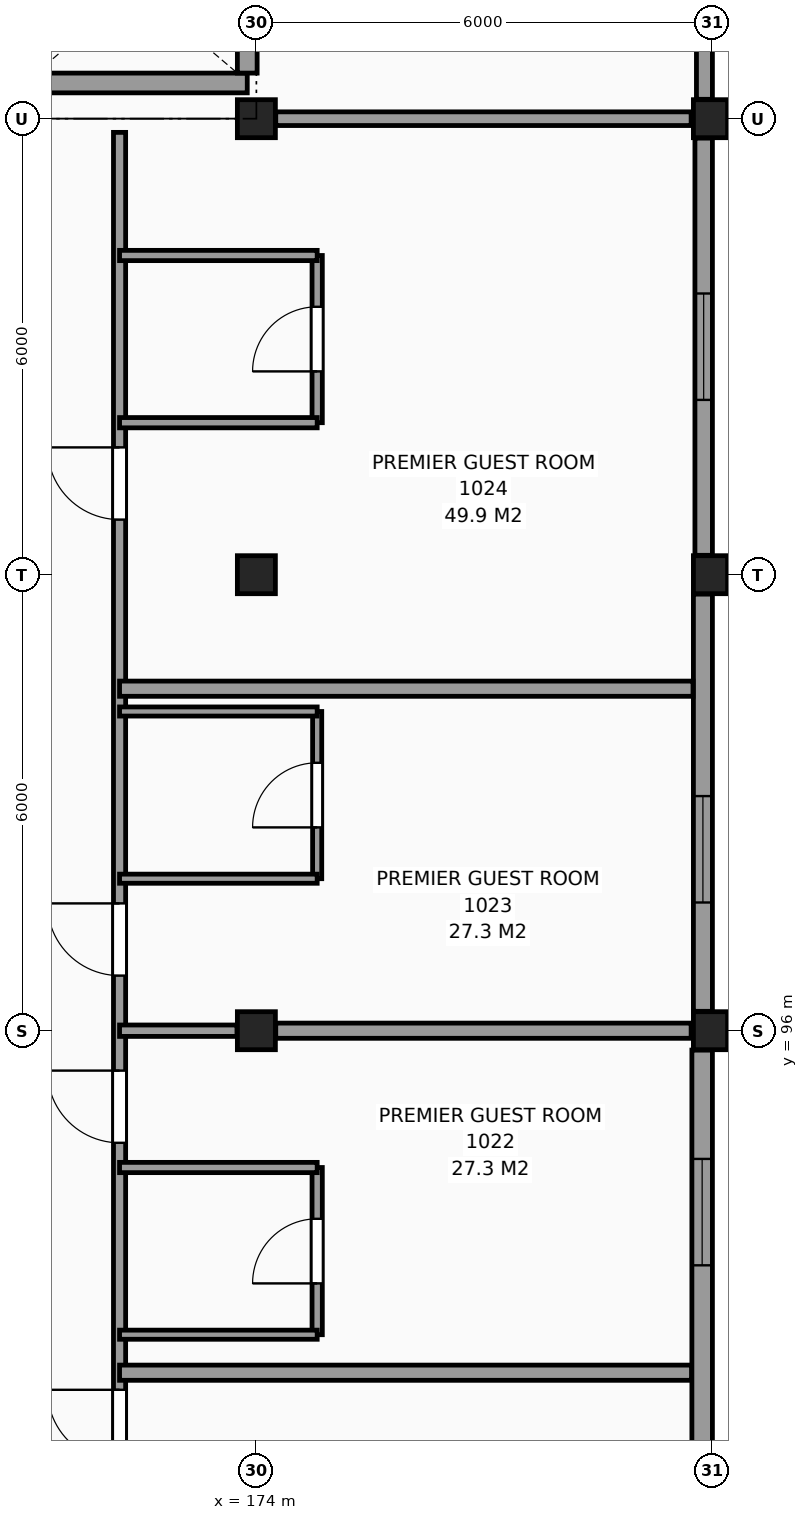
"""IFC4 building model, lengths in metres.
Left out: names, types, materials, properties, quantities, classifications, styles, units other than length and angle.
Written with IfcOpenShell. Run it as: python <this file> out.ifc"""

import sys

from ifc_helpers import new_model, si_unit, direction, frame, frame_2d, origin, origin_2d, place, context, subcontext, project, spatial, rectangle, extrude, element, fill, save


model = new_model("IFC4")
c1 = context("Model", 3, precision=1e-05, world=origin(), true_north=direction((0.0, 1.0)))
c2 = subcontext(c1, "Body", "Model", "MODEL_VIEW")
j1 = project(units=[si_unit("LENGTHUNIT", "METRE"), si_unit("PLANEANGLEUNIT", "RADIAN")], contexts=[c1])
p1 = place(None, origin())
s1 = spatial("IfcSite", under=j1, at=p1, CompositionType="ELEMENT")
p2 = place(p1, origin())
s2 = spatial("IfcBuilding", under=s1, at=p2, CompositionType="ELEMENT")
p3 = place(p2, frame((0.0, 0.0, 41.4)))
s3 = spatial("IfcBuildingStorey", under=s2, at=p3, CompositionType="ELEMENT", Elevation=41.4)
for number, where, z_axis, x_axis in (
    (1, (174.0, 96.0, 0.0), (0.0, 0.0, 1.0), (1.0, 0.0, 0.0)),
    (2, (174.0, 102.0, 0.0), (0.0, 0.0, 1.0), (1.0, 0.0, 0.0)),
    (3, (174.0, 108.0, 0.0), (0.0, 0.0, 1.0), (1.0, 0.0, 0.0)),
    (4, (180.0, 96.0, 0.0), (0.0, 0.0, 1.0), (1.0, 0.0, 0.0)),
    (5, (180.0, 102.0, 0.0), (0.0, 0.0, 1.0), (1.0, 0.0, 0.0)),
    (6, (180.0, 108.0, 0.0), (0.0, 0.0, 1.0), (1.0, 0.0, 0.0)),
):
    element("IfcColumn", number, at=place(p3, frame(where, z_axis=z_axis, x_axis=x_axis)), inside=s3, PredefinedType="COLUMN", context=c2, shape_type="SweptSolid", body=[
        extrude(rectangle(XDim=0.5, YDim=0.5, at=origin_2d()), origin(), (0.0, 0.0, 1.0), 3.3),
    ])
p4 = place(p3, frame((179.865, 90.255, 0.0), z_axis=(0.0, 0.0, 1.0), x_axis=(0.0, 1.0, 0.0)))
e7 = element("IfcWall", 7, at=p4, inside=s3, PredefinedType="SOLIDWALL", context=c2, shape_type="SweptSolid", body=[
    extrude(rectangle(XDim=5.49, YDim=0.27, at=frame_2d((2.745, 0.0))), origin(), (0.0, 0.0, 1.0), 2.41),
])
p5 = place(p4, frame((2.658, 0.0, 0.8)))
e8 = element("IfcOpeningElement", 8, at=p5, cuts=e7, PredefinedType="OPENING", context=c2, shape_type="SweptSolid", body=[
    extrude(rectangle(XDim=1.4, YDim=1.4, at=frame_2d((0.7, 0.7))), frame((0.0, 0.145, 0.0), z_axis=(0.0, -1.0, 0.0), x_axis=(1.0, 0.0, 0.0)), (0.0, 0.0, 1.0), 0.29),
])
p6 = place(p3, frame((179.875, 96.255, 0.0), z_axis=(0.0, 0.0, 1.0), x_axis=(0.0, 1.0, 0.0)))
e9 = element("IfcWall", 9, at=p6, inside=s3, PredefinedType="SOLIDWALL", context=c2, shape_type="SweptSolid", body=[
    extrude(rectangle(XDim=5.49, YDim=0.25, at=frame_2d((2.745, 0.0))), origin(), (0.0, 0.0, 1.0), 2.41),
])
p7 = place(p6, frame((1.432, 0.0, 0.8)))
e10 = element("IfcOpeningElement", 10, at=p7, cuts=e9, PredefinedType="OPENING", context=c2, shape_type="SweptSolid", body=[
    extrude(rectangle(XDim=1.4, YDim=1.4, at=frame_2d((0.7, 0.7))), frame((0.0, 0.135, 0.0), z_axis=(0.0, -1.0, 0.0), x_axis=(1.0, 0.0, 0.0)), (0.0, 0.0, 1.0), 0.27),
])
p8 = place(p3, frame((179.885, 102.255, 0.0), z_axis=(0.0, 0.0, 1.0), x_axis=(0.0, 1.0, 0.0)))
e11 = element("IfcWall", 11, at=p8, inside=s3, PredefinedType="SOLIDWALL", context=c2, shape_type="SweptSolid", body=[
    extrude(rectangle(XDim=5.49, YDim=0.23, at=frame_2d((2.745, 0.0))), origin(), (0.0, 0.0, 1.0), 2.41),
])
p9 = place(p8, frame((2.045, 0.0, 0.8)))
e12 = element("IfcOpeningElement", 12, at=p9, cuts=e11, PredefinedType="OPENING", context=c2, shape_type="SweptSolid", body=[
    extrude(rectangle(XDim=1.4, YDim=1.4, at=frame_2d((0.7, 0.7))), frame((0.0, 0.125, 0.0), z_axis=(0.0, -1.0, 0.0), x_axis=(1.0, 0.0, 0.0)), (0.0, 0.0, 1.0), 0.25),
])
p10 = place(p3, frame((179.895, 108.255, 0.0), z_axis=(0.0, 0.0, 1.0), x_axis=(0.0, 1.0, 0.0)))
e13 = element("IfcWall", 13, at=p10, inside=s3, PredefinedType="SOLIDWALL", context=c2, shape_type="SweptSolid", body=[
    extrude(rectangle(XDim=5.49, YDim=0.21, at=frame_2d((2.745, 0.0))), origin(), (0.0, 0.0, 1.0), 2.41),
])
p11 = place(p3, frame((170.97, 108.47, 0.0), z_axis=(0.0, 0.0, 1.0), x_axis=(1.0, 0.0, 0.0)))
e14 = element("IfcWall", 14, at=p11, inside=s3, PredefinedType="SHEAR", context=c2, shape_type="SweptSolid", body=[
    extrude(rectangle(XDim=2.91, YDim=0.26, at=frame_2d((1.455, 0.0))), origin(), (0.0, 0.0, 1.0), 3.3),
])
p12 = place(p3, frame((173.88, 108.6, 0.0), z_axis=(0.0, 0.0, 1.0), x_axis=(0.0, 1.0, 0.0)))
e15 = element("IfcWall", 15, at=p12, inside=s3, PredefinedType="SHEAR", context=c2, shape_type="SweptSolid", body=[
    extrude(rectangle(XDim=2.25, YDim=0.26, at=frame_2d((1.125, 0.0))), origin(), (0.0, 0.0, 1.0), 3.3),
])
p13 = place(p3, frame((172.2, 42.275, 0.0), z_axis=(0.0, 0.0, 1.0), x_axis=(0.0, 1.0, 0.0)))
e16 = element("IfcWall", 16, at=p13, inside=s3, PredefinedType="PARTITIONING", context=c2, shape_type="SweptSolid", body=[
    extrude(rectangle(XDim=65.545, YDim=0.16, at=frame_2d((32.772, 0.0))), origin(), (0.0, 0.0, 1.0), 3.06),
])
p14 = place(p13, frame((0.4, 0.0, 0.0)))
e17 = element("IfcOpeningElement", 17, at=p14, cuts=e16, PredefinedType="OPENING", context=c2, shape_type="SweptSolid", body=[
    extrude(rectangle(XDim=0.95, YDim=2.1, at=frame_2d((0.475, 1.05))), frame((0.0, 0.09, 0.0), z_axis=(0.0, -1.0, 0.0), x_axis=(1.0, 0.0, 0.0)), (0.0, 0.0, 1.0), 0.18),
])
p15 = place(p13, frame((4.85, 0.0, 0.0)))
e18 = element("IfcOpeningElement", 18, at=p15, cuts=e16, PredefinedType="OPENING", context=c2, shape_type="SweptSolid", body=[
    extrude(rectangle(XDim=0.95, YDim=2.1, at=frame_2d((0.475, 1.05))), frame((0.0, 0.09, 0.0), z_axis=(0.0, -1.0, 0.0), x_axis=(1.0, 0.0, 0.0)), (0.0, 0.0, 1.0), 0.18),
])
p16 = place(p13, frame((9.35, 0.0, 0.0)))
e19 = element("IfcOpeningElement", 19, at=p16, cuts=e16, PredefinedType="OPENING", context=c2, shape_type="SweptSolid", body=[
    extrude(rectangle(XDim=0.95, YDim=2.1, at=frame_2d((0.475, 1.05))), frame((0.0, 0.09, 0.0), z_axis=(0.0, -1.0, 0.0), x_axis=(1.0, 0.0, 0.0)), (0.0, 0.0, 1.0), 0.18),
])
p17 = place(p13, frame((18.45, 0.0, 0.0)))
e20 = element("IfcOpeningElement", 20, at=p17, cuts=e16, PredefinedType="OPENING", context=c2, shape_type="SweptSolid", body=[
    extrude(rectangle(XDim=0.95, YDim=2.1, at=frame_2d((0.475, 1.05))), frame((0.0, 0.09, 0.0), z_axis=(0.0, -1.0, 0.0), x_axis=(1.0, 0.0, 0.0)), (0.0, 0.0, 1.0), 0.18),
])
p18 = place(p13, frame((22.85, 0.0, 0.0)))
e21 = element("IfcOpeningElement", 21, at=p18, cuts=e16, PredefinedType="OPENING", context=c2, shape_type="SweptSolid", body=[
    extrude(rectangle(XDim=0.95, YDim=2.1, at=frame_2d((0.475, 1.05))), frame((0.0, 0.09, 0.0), z_axis=(0.0, -1.0, 0.0), x_axis=(1.0, 0.0, 0.0)), (0.0, 0.0, 1.0), 0.18),
])
p19 = place(p13, frame((30.05, 0.0, 0.0)))
e22 = element("IfcOpeningElement", 22, at=p19, cuts=e16, PredefinedType="OPENING", context=c2, shape_type="SweptSolid", body=[
    extrude(rectangle(XDim=0.95, YDim=2.1, at=frame_2d((0.475, 1.05))), frame((0.0, 0.09, 0.0), z_axis=(0.0, -1.0, 0.0), x_axis=(1.0, 0.0, 0.0)), (0.0, 0.0, 1.0), 0.18),
])
p20 = place(p13, frame((38.3, 0.0, 0.0)))
e23 = element("IfcOpeningElement", 23, at=p20, cuts=e16, PredefinedType="OPENING", context=c2, shape_type="SweptSolid", body=[
    extrude(rectangle(XDim=0.95, YDim=2.1, at=frame_2d((0.475, 1.05))), frame((0.0, 0.09, 0.0), z_axis=(0.0, -1.0, 0.0), x_axis=(1.0, 0.0, 0.0)), (0.0, 0.0, 1.0), 0.18),
])
p21 = place(p13, frame((40.85, 0.0, 0.0)))
e24 = element("IfcOpeningElement", 24, at=p21, cuts=e16, PredefinedType="OPENING", context=c2, shape_type="SweptSolid", body=[
    extrude(rectangle(XDim=0.95, YDim=2.1, at=frame_2d((0.475, 1.05))), frame((0.0, 0.09, 0.0), z_axis=(0.0, -1.0, 0.0), x_axis=(1.0, 0.0, 0.0)), (0.0, 0.0, 1.0), 0.18),
])
p22 = place(p13, frame((48.05, 0.0, 0.0)))
e25 = element("IfcOpeningElement", 25, at=p22, cuts=e16, PredefinedType="OPENING", context=c2, shape_type="SweptSolid", body=[
    extrude(rectangle(XDim=0.95, YDim=2.1, at=frame_2d((0.475, 1.05))), frame((0.0, 0.09, 0.0), z_axis=(0.0, -1.0, 0.0), x_axis=(1.0, 0.0, 0.0)), (0.0, 0.0, 1.0), 0.18),
])
p23 = place(p13, frame((52.25, 0.0, 0.0)))
e26 = element("IfcOpeningElement", 26, at=p23, cuts=e16, PredefinedType="OPENING", context=c2, shape_type="SweptSolid", body=[
    extrude(rectangle(XDim=0.95, YDim=2.1, at=frame_2d((0.475, 1.05))), frame((0.0, 0.09, 0.0), z_axis=(0.0, -1.0, 0.0), x_axis=(1.0, 0.0, 0.0)), (0.0, 0.0, 1.0), 0.18),
])
p24 = place(p13, frame((54.45, 0.0, 0.0)))
e27 = element("IfcOpeningElement", 27, at=p24, cuts=e16, PredefinedType="OPENING", context=c2, shape_type="SweptSolid", body=[
    extrude(rectangle(XDim=0.95, YDim=2.1, at=frame_2d((0.475, 1.05))), frame((0.0, 0.09, 0.0), z_axis=(0.0, -1.0, 0.0), x_axis=(1.0, 0.0, 0.0)), (0.0, 0.0, 1.0), 0.18),
])
p25 = place(p13, frame((60.45, 0.0, 0.0)))
e28 = element("IfcOpeningElement", 28, at=p25, cuts=e16, PredefinedType="OPENING", context=c2, shape_type="SweptSolid", body=[
    extrude(rectangle(XDim=0.95, YDim=2.1, at=frame_2d((0.475, 1.05))), frame((0.0, 0.09, 0.0), z_axis=(0.0, -1.0, 0.0), x_axis=(1.0, 0.0, 0.0)), (0.0, 0.0, 1.0), 0.18),
])
p26 = place(p3, frame((174.8, 92.0, 0.0), z_axis=(0.0, 0.0, 1.0), x_axis=(0.0, 1.0, 0.0)))
e29 = element("IfcWall", 29, at=p26, inside=s3, PredefinedType="PARTITIONING", context=c2, shape_type="SweptSolid", body=[
    extrude(rectangle(XDim=2.2, YDim=0.135, at=frame_2d((1.1, 0.0))), origin(), (0.0, 0.0, 1.0), 3.06),
])
p27 = place(p26, frame((0.675, 0.0, 0.0)))
e30 = element("IfcOpeningElement", 30, at=p27, cuts=e29, PredefinedType="OPENING", context=c2, shape_type="SweptSolid", body=[
    extrude(rectangle(XDim=0.85, YDim=2.1, at=frame_2d((0.425, 1.05))), frame((0.0, 0.078, 0.0), z_axis=(0.0, -1.0, 0.0), x_axis=(1.0, 0.0, 0.0)), (0.0, 0.0, 1.0), 0.155),
])
p28 = place(p3, frame((174.8, 98.0, 0.0), z_axis=(0.0, 0.0, 1.0), x_axis=(0.0, 1.0, 0.0)))
e31 = element("IfcWall", 31, at=p28, inside=s3, PredefinedType="PARTITIONING", context=c2, shape_type="SweptSolid", body=[
    extrude(rectangle(XDim=2.2, YDim=0.12, at=frame_2d((1.1, 0.0))), origin(), (0.0, 0.0, 1.0), 3.06),
])
p29 = place(p28, frame((0.675, 0.0, 0.0)))
e32 = element("IfcOpeningElement", 32, at=p29, cuts=e31, PredefinedType="OPENING", context=c2, shape_type="SweptSolid", body=[
    extrude(rectangle(XDim=0.85, YDim=2.1, at=frame_2d((0.425, 1.05))), frame((0.0, 0.07, 0.0), z_axis=(0.0, -1.0, 0.0), x_axis=(1.0, 0.0, 0.0)), (0.0, 0.0, 1.0), 0.14),
])
p30 = place(p3, frame((174.8, 104.0, 0.0), z_axis=(0.0, 0.0, 1.0), x_axis=(0.0, 1.0, 0.0)))
e33 = element("IfcWall", 33, at=p30, inside=s3, PredefinedType="PARTITIONING", context=c2, shape_type="SweptSolid", body=[
    extrude(rectangle(XDim=2.2, YDim=0.135, at=frame_2d((1.1, 0.0))), origin(), (0.0, 0.0, 1.0), 3.06),
])
p31 = place(p30, frame((0.675, 0.0, 0.0)))
e34 = element("IfcOpeningElement", 34, at=p31, cuts=e33, PredefinedType="OPENING", context=c2, shape_type="SweptSolid", body=[
    extrude(rectangle(XDim=0.85, YDim=2.1, at=frame_2d((0.425, 1.05))), frame((0.0, 0.078, 0.0), z_axis=(0.0, -1.0, 0.0), x_axis=(1.0, 0.0, 0.0)), (0.0, 0.0, 1.0), 0.155),
])
p32 = place(p3, frame((172.2, 91.5, 0.0), z_axis=(0.0, 0.0, 1.0), x_axis=(1.0, 0.0, 0.0)))
e35 = element("IfcWall", 35, at=p32, inside=s3, PredefinedType="PARTITIONING", context=c2, shape_type="SweptSolid", body=[
    extrude(rectangle(XDim=7.525, YDim=0.2, at=frame_2d((3.763, 0.0))), origin(), (0.0, 0.0, 1.0), 3.06),
])
p33 = place(p3, frame((172.2, 92.0, 0.0), z_axis=(0.0, 0.0, 1.0), x_axis=(1.0, 0.0, 0.0)))
e36 = element("IfcWall", 36, at=p33, inside=s3, PredefinedType="PARTITIONING", context=c2, shape_type="SweptSolid", body=[
    extrude(rectangle(XDim=2.6, YDim=0.12, at=frame_2d((1.3, 0.0))), origin(), (0.0, 0.0, 1.0), 3.06),
])
p34 = place(p3, frame((172.2, 94.2, 0.0), z_axis=(0.0, 0.0, 1.0), x_axis=(1.0, 0.0, 0.0)))
e37 = element("IfcWall", 37, at=p34, inside=s3, PredefinedType="PARTITIONING", context=c2, shape_type="SweptSolid", body=[
    extrude(rectangle(XDim=2.6, YDim=0.135, at=frame_2d((1.3, 0.0))), origin(), (0.0, 0.0, 1.0), 3.06),
])
p35 = place(p3, frame((172.2, 96.0, 0.0), z_axis=(0.0, 0.0, 1.0), x_axis=(1.0, 0.0, 0.0)))
e38 = element("IfcWall", 38, at=p35, inside=s3, PredefinedType="PARTITIONING", context=c2, shape_type="SweptSolid", body=[
    extrude(rectangle(XDim=1.545, YDim=0.15, at=frame_2d((0.772, 0.0))), origin(), (0.0, 0.0, 1.0), 2.77),
])
p36 = place(p3, frame((174.255, 96.0, 0.0), z_axis=(0.0, 0.0, 1.0), x_axis=(1.0, 0.0, 0.0)))
e39 = element("IfcWall", 39, at=p36, inside=s3, PredefinedType="PARTITIONING", context=c2, shape_type="SweptSolid", body=[
    extrude(rectangle(XDim=5.465, YDim=0.2, at=frame_2d((2.732, 0.0))), origin(), (0.0, 0.0, 1.0), 2.26),
])
for number, where, z_axis, x_axis in (
    (40, (172.2, 98.0, 0.0), (0.0, 0.0, 1.0), (1.0, 0.0, 0.0)),
    (41, (172.2, 100.2, 0.0), (0.0, 0.0, 1.0), (1.0, 0.0, 0.0)),
):
    element("IfcWall", number, at=place(p3, frame(where, z_axis=z_axis, x_axis=x_axis)), inside=s3, PredefinedType="PARTITIONING", context=c2, shape_type="SweptSolid", body=[
        extrude(rectangle(XDim=2.6, YDim=0.12, at=frame_2d((1.3, 0.0))), origin(), (0.0, 0.0, 1.0), 3.06),
    ])
p37 = place(p3, frame((172.2, 100.5, 0.0), z_axis=(0.0, 0.0, 1.0), x_axis=(1.0, 0.0, 0.0)))
e42 = element("IfcWall", 42, at=p37, inside=s3, PredefinedType="PARTITIONING", context=c2, shape_type="SweptSolid", body=[
    extrude(rectangle(XDim=7.545, YDim=0.2, at=frame_2d((3.772, 0.0))), origin(), (0.0, 0.0, 1.0), 3.06),
])
for number, where, z_axis, x_axis in (
    (43, (172.2, 104.0, 0.0), (0.0, 0.0, 1.0), (1.0, 0.0, 0.0)),
    (44, (172.2, 106.2, 0.0), (0.0, 0.0, 1.0), (1.0, 0.0, 0.0)),
):
    element("IfcWall", number, at=place(p3, frame(where, z_axis=z_axis, x_axis=x_axis)), inside=s3, PredefinedType="PARTITIONING", context=c2, shape_type="SweptSolid", body=[
        extrude(rectangle(XDim=2.6, YDim=0.135, at=frame_2d((1.3, 0.0))), origin(), (0.0, 0.0, 1.0), 3.06),
    ])
p38 = place(p3, frame((174.255, 108.0, 0.0), z_axis=(0.0, 0.0, 1.0), x_axis=(1.0, 0.0, 0.0)))
e45 = element("IfcWall", 45, at=p38, inside=s3, PredefinedType="PARTITIONING", context=c2, shape_type="SweptSolid", body=[
    extrude(rectangle(XDim=5.465, YDim=0.18, at=frame_2d((2.732, 0.0))), origin(), (0.0, 0.0, 1.0), 2.26),
])
p39 = place(p5, origin())
e46 = element("IfcWindow", 46, at=p39, inside=s3, PartitioningType="SINGLE_PANEL", PredefinedType="WINDOW", context=c2, shape_type="SweptSolid", body=[
    extrude(rectangle(XDim=1.4, YDim=1.4, at=frame_2d((0.7, 0.7))), frame((0.0, 0.03, 0.0), z_axis=(0.0, -1.0, 0.0), x_axis=(1.0, 0.0, 0.0)), (0.0, 0.0, 1.0), 0.06),
])
fill(e8, e46)
p40 = place(p7, origin())
e47 = element("IfcWindow", 47, at=p40, inside=s3, PartitioningType="SINGLE_PANEL", PredefinedType="WINDOW", context=c2, shape_type="SweptSolid", body=[
    extrude(rectangle(XDim=1.4, YDim=1.4, at=frame_2d((0.7, 0.7))), frame((0.0, 0.03, 0.0), z_axis=(0.0, -1.0, 0.0), x_axis=(1.0, 0.0, 0.0)), (0.0, 0.0, 1.0), 0.06),
])
fill(e10, e47)
p41 = place(p9, origin())
e48 = element("IfcWindow", 48, at=p41, inside=s3, PartitioningType="SINGLE_PANEL", PredefinedType="WINDOW", context=c2, shape_type="SweptSolid", body=[
    extrude(rectangle(XDim=1.4, YDim=1.4, at=frame_2d((0.7, 0.7))), frame((0.0, 0.03, 0.0), z_axis=(0.0, -1.0, 0.0), x_axis=(1.0, 0.0, 0.0)), (0.0, 0.0, 1.0), 0.06),
])
fill(e12, e48)
p42 = place(p22, origin())
e49 = element("IfcDoor", 49, at=p42, inside=s3, OperationType="SINGLE_SWING_RIGHT", PredefinedType="DOOR", context=c2, shape_type="SweptSolid", body=[
    extrude(rectangle(XDim=0.95, YDim=2.1, at=frame_2d((0.475, 1.05))), frame((0.0, 0.025, 0.0), z_axis=(0.0, -1.0, 0.0), x_axis=(1.0, 0.0, 0.0)), (0.0, 0.0, 1.0), 0.05),
])
fill(e25, e49)
p43 = place(p27, origin())
e50 = element("IfcDoor", 50, at=p43, inside=s3, OperationType="SINGLE_SWING_LEFT", PredefinedType="DOOR", context=c2, shape_type="SweptSolid", body=[
    extrude(rectangle(XDim=0.85, YDim=2.1, at=frame_2d((0.425, 1.05))), frame((0.0, 0.025, 0.0), z_axis=(0.0, -1.0, 0.0), x_axis=(1.0, 0.0, 0.0)), (0.0, 0.0, 1.0), 0.05),
])
fill(e30, e50)
p44 = place(p23, origin())
e51 = element("IfcDoor", 51, at=p44, inside=s3, OperationType="SINGLE_SWING_RIGHT", PredefinedType="DOOR", context=c2, shape_type="SweptSolid", body=[
    extrude(rectangle(XDim=0.95, YDim=2.1, at=frame_2d((0.475, 1.05))), frame((0.0, 0.025, 0.0), z_axis=(0.0, -1.0, 0.0), x_axis=(1.0, 0.0, 0.0)), (0.0, 0.0, 1.0), 0.05),
])
fill(e26, e51)
p45 = place(p29, origin())
e52 = element("IfcDoor", 52, at=p45, inside=s3, OperationType="SINGLE_SWING_LEFT", PredefinedType="DOOR", context=c2, shape_type="SweptSolid", body=[
    extrude(rectangle(XDim=0.85, YDim=2.1, at=frame_2d((0.425, 1.05))), frame((0.0, 0.025, 0.0), z_axis=(0.0, -1.0, 0.0), x_axis=(1.0, 0.0, 0.0)), (0.0, 0.0, 1.0), 0.05),
])
fill(e32, e52)
p46 = place(p24, origin())
e53 = element("IfcDoor", 53, at=p46, inside=s3, OperationType="SINGLE_SWING_RIGHT", PredefinedType="DOOR", context=c2, shape_type="SweptSolid", body=[
    extrude(rectangle(XDim=0.95, YDim=2.1, at=frame_2d((0.475, 1.05))), frame((0.0, 0.025, 0.0), z_axis=(0.0, -1.0, 0.0), x_axis=(1.0, 0.0, 0.0)), (0.0, 0.0, 1.0), 0.05),
])
fill(e27, e53)
p47 = place(p31, origin())
e54 = element("IfcDoor", 54, at=p47, inside=s3, OperationType="SINGLE_SWING_LEFT", PredefinedType="DOOR", context=c2, shape_type="SweptSolid", body=[
    extrude(rectangle(XDim=0.85, YDim=2.1, at=frame_2d((0.425, 1.05))), frame((0.0, 0.025, 0.0), z_axis=(0.0, -1.0, 0.0), x_axis=(1.0, 0.0, 0.0)), (0.0, 0.0, 1.0), 0.05),
])
fill(e34, e54)
p48 = place(p25, origin())
e55 = element("IfcDoor", 55, at=p48, inside=s3, OperationType="SINGLE_SWING_RIGHT", PredefinedType="DOOR", context=c2, shape_type="SweptSolid", body=[
    extrude(rectangle(XDim=0.95, YDim=2.1, at=frame_2d((0.475, 1.05))), frame((0.0, 0.025, 0.0), z_axis=(0.0, -1.0, 0.0), x_axis=(1.0, 0.0, 0.0)), (0.0, 0.0, 1.0), 0.05),
])
fill(e28, e55)
save(model, sys.argv[1])
